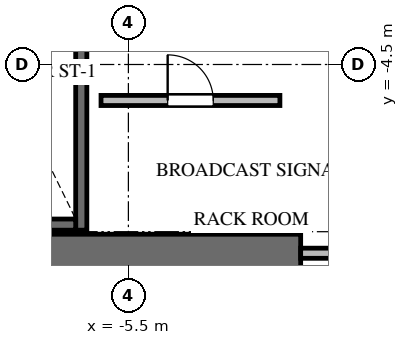
"""IFC4 building model, lengths in metres.
Left out: names, types, materials, properties, quantities, classifications, styles, units other than length and angle.
Written with IfcOpenShell. Run it as: python <this file> out.ifc"""

import sys

from ifc_helpers import new_model, si_unit, direction, frame, frame_2d, origin, place, context, subcontext, project, spatial, rectangle, extrude, source, transform, mapped, element, fill, save


model = new_model("IFC4")
c1 = context("Model", 3, precision=1e-05, world=origin(), true_north=direction((0.0, 1.0)))
c2 = subcontext(c1, "Body", "Model", "MODEL_VIEW")
j1 = project(units=[si_unit("LENGTHUNIT", "METRE"), si_unit("PLANEANGLEUNIT", "RADIAN")], contexts=[c1])
p1 = place(None, origin())
s1 = spatial("IfcSite", under=j1, at=p1, CompositionType="ELEMENT")
p2 = place(p1, origin())
s2 = spatial("IfcBuilding", under=s1, at=p2, CompositionType="ELEMENT")
p3 = place(p2, frame((0.0, 0.0, 140.1)))
s3 = spatial("IfcBuildingStorey", under=s2, at=p3, CompositionType="ELEMENT", Elevation=140.1)
p4 = place(p3, frame((-9.85, -8.225, 0.0), z_axis=(0.0, 0.0, 1.0), x_axis=(1.0, 0.0, 0.0)))
e1 = element("IfcWall", 1, at=p4, inside=s3, PredefinedType="SHEAR", context=c2, shape_type="SweptSolid", body=[
    extrude(rectangle(XDim=7.75, YDim=0.75, at=frame_2d((3.875, 0.0))), origin(), (0.0, 0.0, 1.0), 3.0),
])
p5 = place(p3, frame((-6.43, -7.77, -0.24), z_axis=(0.0, 0.0, 1.0), x_axis=(0.0, 1.0, 0.0)))
e2 = element("IfcWall", 2, at=p5, inside=s3, PredefinedType="SHEAR", context=c2, shape_type="SweptSolid", body=[
    extrude(rectangle(XDim=7.89, YDim=0.22, at=frame_2d((3.945, 0.0))), origin(), (0.0, 0.0, 1.0), 3.0),
])
p6 = place(p5, frame((6.32, 0.0, 0.0)))
e3 = element("IfcOpeningElement", 3, at=p6, cuts=e2, PredefinedType="OPENING", context=c2, shape_type="SweptSolid", body=[
    extrude(rectangle(XDim=1.05, YDim=2.15, at=frame_2d((0.525, 1.075))), frame((0.0, 0.12, 0.0), z_axis=(0.0, -1.0, 0.0), x_axis=(1.0, 0.0, 0.0)), (0.0, 0.0, 1.0), 0.24),
])
p7 = place(p3, frame((-9.5, -7.66, -0.24), z_axis=(0.0, 0.0, 1.0), x_axis=(1.0, 0.0, 0.0)))
e4 = element("IfcWall", 4, at=p7, inside=s3, PredefinedType="SHEAR", context=c2, shape_type="SweptSolid", body=[
    extrude(rectangle(XDim=2.96, YDim=0.22, at=frame_2d((1.48, 0.0))), origin(), (0.0, 0.0, 1.0), 3.0),
])
p8 = place(p3, frame((-2.1, -8.225, 0.0), z_axis=(0.0, 0.0, 1.0), x_axis=(1.0, 0.0, 0.0)))
e5 = element("IfcWall", 5, at=p8, inside=s3, PredefinedType="SOLIDWALL", context=c2, shape_type="SweptSolid", body=[
    extrude(rectangle(XDim=4.2, YDim=0.2, at=frame_2d((2.1, 0.0))), origin(), (0.0, 0.0, 1.0), 2.745),
])
p9 = place(p8, frame((1.2, 0.0, 0.0)))
e6 = element("IfcOpeningElement", 6, at=p9, cuts=e5, PredefinedType="OPENING", context=c2, shape_type="SweptSolid", body=[
    extrude(rectangle(XDim=1.8, YDim=2.15, at=frame_2d((0.9, 1.075))), frame((0.0, 0.11, 0.0), z_axis=(0.0, -1.0, 0.0), x_axis=(1.0, 0.0, 0.0)), (0.0, 0.0, 1.0), 0.22),
])
p10 = place(p3, frame((-6.04, -5.21, 0.0), z_axis=(0.0, 0.0, 1.0), x_axis=(1.0, 0.0, 0.0)))
e7 = element("IfcWall", 7, at=p10, inside=s3, PredefinedType="SOLIDWALL", context=c2, shape_type="SweptSolid", body=[
    extrude(rectangle(XDim=3.53, YDim=0.2, at=frame_2d((1.765, 0.0))), origin(), (0.0, 0.0, 1.0), 2.745),
])
p11 = place(p10, frame((1.315, 0.0, 0.0)))
e8 = element("IfcOpeningElement", 8, at=p11, cuts=e7, PredefinedType="OPENING", context=c2, shape_type="SweptSolid", body=[
    extrude(rectangle(XDim=0.9, YDim=2.05, at=frame_2d((0.45, 1.025))), frame((0.0, 0.11, 0.0), z_axis=(0.0, -1.0, 0.0), x_axis=(1.0, 0.0, 0.0)), (0.0, 0.0, 1.0), 0.22),
])
m1 = source(origin(), c2, "Body", "SweptSolid", [
    extrude(rectangle(XDim=0.9, YDim=2.05, at=frame_2d((0.45, 1.025))), frame((0.0, 0.025, 0.0), z_axis=(0.0, -1.0, 0.0), x_axis=(1.0, 0.0, 0.0)), (0.0, 0.0, 1.0), 0.05),
])
p12 = place(p11, origin())
e9 = element("IfcDoor", 9, at=p12, inside=s3, OperationType="SINGLE_SWING_LEFT", PredefinedType="DOOR", context=c2, shape_type="MappedRepresentation", body=[
    mapped(m1, transform((0.0, 0.0, 0.0), x_axis=(1.0, 0.0, 0.0), y_axis=(0.0, 1.0, 0.0), z_axis=(0.0, 0.0, 1.0), scale=1.0)),
])
fill(e8, e9)
save(model, sys.argv[1])
